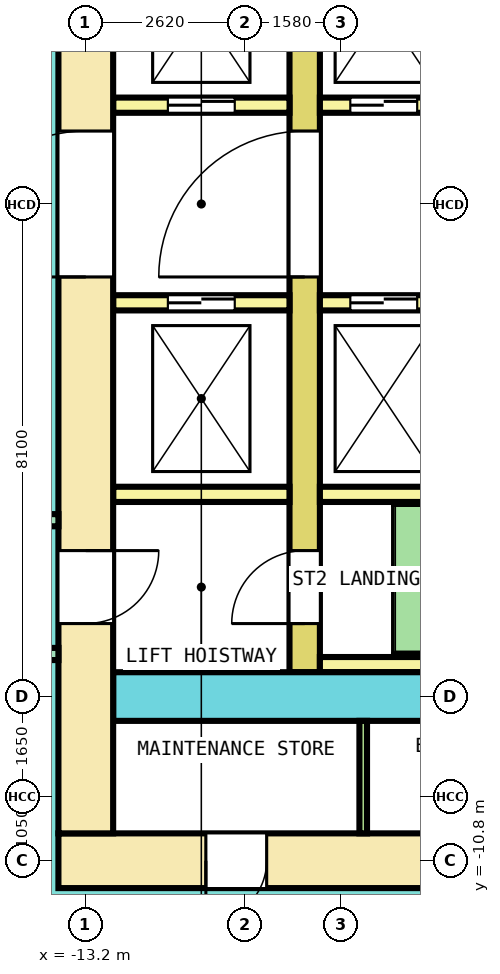
"""IFC4 building model, lengths in metres.
Left out: names, types, materials, properties, quantities, classifications, styles, units other than length and angle.
Written with IfcOpenShell. Run it as: python <this file> out.ifc"""

import sys

from ifc_helpers import new_model, si_unit, direction, frame, frame_2d, origin, place, context, subcontext, project, spatial, rectangle, extrude, element, fill, save


model = new_model("IFC4")
c1 = context("Model", 3, precision=1e-05, world=origin(), true_north=direction((0.0, 1.0)))
c2 = subcontext(c1, "Body", "Model", "MODEL_VIEW")
j1 = project(units=[si_unit("LENGTHUNIT", "METRE"), si_unit("PLANEANGLEUNIT", "RADIAN")], contexts=[c1])
p1 = place(None, origin())
s1 = spatial("IfcSite", under=j1, at=p1, CompositionType="ELEMENT")
p2 = place(p1, origin())
s2 = spatial("IfcBuilding", under=s1, at=p2, CompositionType="ELEMENT")
p3 = place(p2, origin())
s3 = spatial("IfcBuildingStorey", under=s2, at=p3, CompositionType="ELEMENT", Elevation=0.0)
p4 = place(p3, frame((-13.65, -10.8, 0.0), z_axis=(0.0, 0.0, 1.0), x_axis=(1.0, 0.0, 0.0)))
e1 = element("IfcWall", 1, at=p4, inside=s3, PredefinedType="SHEAR", context=c2, shape_type="SweptSolid", body=[
    extrude(rectangle(XDim=27.3, YDim=0.9, at=frame_2d((13.65, 0.0))), origin(), (0.0, 0.0, 1.0), 5.3),
])
p5 = place(p4, frame((2.425, 0.0, 0.0)))
e2 = element("IfcOpeningElement", 2, at=p5, cuts=e1, PredefinedType="OPENING", context=c2, shape_type="SweptSolid", body=[
    extrude(rectangle(XDim=1.0, YDim=2.1, at=frame_2d((0.5, 1.05))), frame((0.0, 0.46, 0.0), z_axis=(0.0, -1.0, 0.0), x_axis=(1.0, 0.0, 0.0)), (0.0, 0.0, 1.0), 0.92),
])
p6 = place(p4, frame((6.569, 0.0, 0.0)))
e3 = element("IfcOpeningElement", 3, at=p6, cuts=e1, PredefinedType="OPENING", context=c2, shape_type="SweptSolid", body=[
    extrude(rectangle(XDim=1.0, YDim=2.1, at=frame_2d((0.5, 1.05))), frame((0.0, 0.46, 0.0), z_axis=(0.0, -1.0, 0.0), x_axis=(1.0, 0.0, 0.0)), (0.0, 0.0, 1.0), 0.92),
])
p7 = place(p4, frame((10.681, 0.0, 0.0)))
e4 = element("IfcOpeningElement", 4, at=p7, cuts=e1, PredefinedType="OPENING", context=c2, shape_type="SweptSolid", body=[
    extrude(rectangle(XDim=1.0, YDim=2.1, at=frame_2d((0.5, 1.05))), frame((0.0, 0.46, 0.0), z_axis=(0.0, -1.0, 0.0), x_axis=(1.0, 0.0, 0.0)), (0.0, 0.0, 1.0), 0.92),
])
p8 = place(p4, frame((19.202, 0.0, 0.0)))
e5 = element("IfcOpeningElement", 5, at=p8, cuts=e1, PredefinedType="OPENING", context=c2, shape_type="SweptSolid", body=[
    extrude(rectangle(XDim=1.0, YDim=2.1, at=frame_2d((0.5, 1.05))), frame((0.0, 0.46, 0.0), z_axis=(0.0, -1.0, 0.0), x_axis=(1.0, 0.0, 0.0)), (0.0, 0.0, 1.0), 0.92),
])
p9 = place(p4, frame((21.881, 0.0, 0.0)))
e6 = element("IfcOpeningElement", 6, at=p9, cuts=e1, PredefinedType="OPENING", context=c2, shape_type="SweptSolid", body=[
    extrude(rectangle(XDim=1.0, YDim=2.1, at=frame_2d((0.5, 1.05))), frame((0.0, 0.46, 0.0), z_axis=(0.0, -1.0, 0.0), x_axis=(1.0, 0.0, 0.0)), (0.0, 0.0, 1.0), 0.92),
])
p10 = place(p4, frame((24.592, 0.0, 0.0)))
e7 = element("IfcOpeningElement", 7, at=p10, cuts=e1, PredefinedType="OPENING", context=c2, shape_type="SweptSolid", body=[
    extrude(rectangle(XDim=1.0, YDim=2.1, at=frame_2d((0.5, 1.05))), frame((0.0, 0.46, 0.0), z_axis=(0.0, -1.0, 0.0), x_axis=(1.0, 0.0, 0.0)), (0.0, 0.0, 1.0), 0.92),
])
p11 = place(p4, frame((15.2, 0.0, 0.0)))
e8 = element("IfcOpeningElement", 8, at=p11, cuts=e1, PredefinedType="OPENING", context=c2, shape_type="SweptSolid", body=[
    extrude(rectangle(XDim=1.2, YDim=2.1, at=frame_2d((0.6, 1.05))), frame((0.0, 0.46, 0.0), z_axis=(0.0, -1.0, 0.0), x_axis=(1.0, 0.0, 0.0)), (0.0, 0.0, 1.0), 0.92),
])
p12 = place(p3, frame((-13.2, -10.35, 0.0), z_axis=(0.0, 0.0, 1.0), x_axis=(0.0, 1.0, 0.0)))
e9 = element("IfcWall", 9, at=p12, inside=s3, PredefinedType="SHEAR", context=c2, shape_type="SweptSolid", body=[
    extrude(rectangle(XDim=20.7, YDim=0.9, at=frame_2d((10.35, 0.0))), origin(), (0.0, 0.0, 1.0), 5.3),
])
p13 = place(p12, frame((9.15, 0.0, 0.0)))
e10 = element("IfcOpeningElement", 10, at=p13, cuts=e9, PredefinedType="OPENING", context=c2, shape_type="SweptSolid", body=[
    extrude(rectangle(XDim=2.4, YDim=2.1, at=frame_2d((1.2, 1.05))), frame((0.0, 0.46, 0.0), z_axis=(0.0, -1.0, 0.0), x_axis=(1.0, 0.0, 0.0)), (0.0, 0.0, 1.0), 0.92),
])
p14 = place(p12, frame((16.05, 0.0, 0.0)))
e11 = element("IfcOpeningElement", 11, at=p14, cuts=e9, PredefinedType="OPENING", context=c2, shape_type="SweptSolid", body=[
    extrude(rectangle(XDim=1.2, YDim=2.1, at=frame_2d((0.6, 1.05))), frame((0.0, 0.46, 0.0), z_axis=(0.0, -1.0, 0.0), x_axis=(1.0, 0.0, 0.0)), (0.0, 0.0, 1.0), 0.92),
])
p15 = place(p12, frame((3.45, 0.0, 0.0)))
e12 = element("IfcOpeningElement", 12, at=p15, cuts=e9, PredefinedType="OPENING", context=c2, shape_type="SweptSolid", body=[
    extrude(rectangle(XDim=1.2, YDim=2.1, at=frame_2d((0.6, 1.05))), frame((0.0, 0.46, 0.0), z_axis=(0.0, -1.0, 0.0), x_axis=(1.0, 0.0, 0.0)), (0.0, 0.0, 1.0), 0.92),
])
p16 = place(p3, frame((-12.75, -8.1, 0.0), z_axis=(0.0, 0.0, 1.0), x_axis=(1.0, 0.0, 0.0)))
e13 = element("IfcWall", 13, at=p16, inside=s3, PredefinedType="SHEAR", context=c2, shape_type="SweptSolid", body=[
    extrude(rectangle(XDim=25.5, YDim=0.8, at=frame_2d((12.75, 0.0))), origin(), (0.0, 0.0, 1.0), 5.3),
])
p17 = place(p16, frame((14.3, 0.0, 0.0)))
e14 = element("IfcOpeningElement", 14, at=p17, cuts=e13, PredefinedType="OPENING", context=c2, shape_type="SweptSolid", body=[
    extrude(rectangle(XDim=1.2, YDim=2.1, at=frame_2d((0.6, 1.05))), frame((0.0, 0.41, 0.0), z_axis=(0.0, -1.0, 0.0), x_axis=(1.0, 0.0, 0.0)), (0.0, 0.0, 1.0), 0.82),
])
p18 = place(p3, frame((-9.6, -7.7, 0.0), z_axis=(0.0, 0.0, 1.0), x_axis=(0.0, 1.0, 0.0)))
e15 = element("IfcWall", 15, at=p18, inside=s3, PredefinedType="SHEAR", context=c2, shape_type="SweptSolid", body=[
    extrude(rectangle(XDim=15.4, YDim=0.5, at=frame_2d((7.7, 0.0))), origin(), (0.0, 0.0, 1.0), 5.3),
])
p19 = place(p18, frame((6.5, 0.0, 0.0)))
e16 = element("IfcOpeningElement", 16, at=p19, cuts=e15, PredefinedType="OPENING", context=c2, shape_type="SweptSolid", body=[
    extrude(rectangle(XDim=2.4, YDim=2.1, at=frame_2d((1.2, 1.05))), frame((0.0, 0.26, 0.0), z_axis=(0.0, -1.0, 0.0), x_axis=(1.0, 0.0, 0.0)), (0.0, 0.0, 1.0), 0.52),
])
p20 = place(p18, frame((13.4, 0.0, 0.0)))
e17 = element("IfcOpeningElement", 17, at=p20, cuts=e15, PredefinedType="OPENING", context=c2, shape_type="SweptSolid", body=[
    extrude(rectangle(XDim=1.2, YDim=2.1, at=frame_2d((0.6, 1.05))), frame((0.0, 0.26, 0.0), z_axis=(0.0, -1.0, 0.0), x_axis=(1.0, 0.0, 0.0)), (0.0, 0.0, 1.0), 0.52),
])
p21 = place(p18, frame((0.8, 0.0, 0.0)))
e18 = element("IfcOpeningElement", 18, at=p21, cuts=e15, PredefinedType="OPENING", context=c2, shape_type="SweptSolid", body=[
    extrude(rectangle(XDim=1.2, YDim=2.1, at=frame_2d((0.6, 1.05))), frame((0.0, 0.26, 0.0), z_axis=(0.0, -1.0, 0.0), x_axis=(1.0, 0.0, 0.0)), (0.0, 0.0, 1.0), 0.52),
])
p22 = place(p3, frame((-12.75, 1.625, 0.0), z_axis=(0.0, 0.0, 1.0), x_axis=(1.0, 0.0, 0.0)))
e19 = element("IfcWall", 19, at=p22, inside=s3, PredefinedType="SOLIDWALL", context=c2, shape_type="SweptSolid", body=[
    extrude(rectangle(XDim=2.9, YDim=0.25, at=frame_2d((1.45, 0.0))), origin(), (0.0, 0.0, 1.0), 5.3),
])
p23 = place(p22, frame((0.9, 0.0, 0.0)))
e20 = element("IfcOpeningElement", 20, at=p23, cuts=e19, PredefinedType="OPENING", context=c2, shape_type="SweptSolid", body=[
    extrude(rectangle(XDim=1.1, YDim=2.1, at=frame_2d((0.55, 1.05))), frame((0.0, 0.135, 0.0), z_axis=(0.0, -1.0, 0.0), x_axis=(1.0, 0.0, 0.0)), (0.0, 0.0, 1.0), 0.27),
])
p24 = place(p3, frame((-9.35, 1.625, 0.0), z_axis=(0.0, 0.0, 1.0), x_axis=(1.0, 0.0, 0.0)))
e21 = element("IfcWall", 21, at=p24, inside=s3, PredefinedType="SOLIDWALL", context=c2, shape_type="SweptSolid", body=[
    extrude(rectangle(XDim=18.7, YDim=0.25, at=frame_2d((9.35, 0.0))), origin(), (0.0, 0.0, 1.0), 5.3),
])
p25 = place(p24, frame((0.5, 0.0, 0.0)))
e22 = element("IfcOpeningElement", 22, at=p25, cuts=e21, PredefinedType="OPENING", context=c2, shape_type="SweptSolid", body=[
    extrude(rectangle(XDim=1.1, YDim=2.1, at=frame_2d((0.55, 1.05))), frame((0.0, 0.135, 0.0), z_axis=(0.0, -1.0, 0.0), x_axis=(1.0, 0.0, 0.0)), (0.0, 0.0, 1.0), 0.27),
])
p26 = place(p24, frame((2.85, 0.0, 0.0)))
e23 = element("IfcOpeningElement", 23, at=p26, cuts=e21, PredefinedType="OPENING", context=c2, shape_type="SweptSolid", body=[
    extrude(rectangle(XDim=1.1, YDim=2.1, at=frame_2d((0.55, 1.05))), frame((0.0, 0.135, 0.0), z_axis=(0.0, -1.0, 0.0), x_axis=(1.0, 0.0, 0.0)), (0.0, 0.0, 1.0), 0.27),
])
p27 = place(p24, frame((5.15, 0.0, 0.0)))
e24 = element("IfcOpeningElement", 24, at=p27, cuts=e21, PredefinedType="OPENING", context=c2, shape_type="SweptSolid", body=[
    extrude(rectangle(XDim=1.1, YDim=2.1, at=frame_2d((0.55, 1.05))), frame((0.0, 0.135, 0.0), z_axis=(0.0, -1.0, 0.0), x_axis=(1.0, 0.0, 0.0)), (0.0, 0.0, 1.0), 0.27),
])
p28 = place(p24, frame((7.65, 0.0, 0.0)))
e25 = element("IfcOpeningElement", 25, at=p28, cuts=e21, PredefinedType="OPENING", context=c2, shape_type="SweptSolid", body=[
    extrude(rectangle(XDim=1.1, YDim=2.1, at=frame_2d((0.55, 1.05))), frame((0.0, 0.135, 0.0), z_axis=(0.0, -1.0, 0.0), x_axis=(1.0, 0.0, 0.0)), (0.0, 0.0, 1.0), 0.27),
])
p29 = place(p24, frame((9.95, 0.0, 0.0)))
e26 = element("IfcOpeningElement", 26, at=p29, cuts=e21, PredefinedType="OPENING", context=c2, shape_type="SweptSolid", body=[
    extrude(rectangle(XDim=1.1, YDim=2.1, at=frame_2d((0.55, 1.05))), frame((0.0, 0.135, 0.0), z_axis=(0.0, -1.0, 0.0), x_axis=(1.0, 0.0, 0.0)), (0.0, 0.0, 1.0), 0.27),
])
p30 = place(p24, frame((12.4, 0.0, 0.0)))
e27 = element("IfcOpeningElement", 27, at=p30, cuts=e21, PredefinedType="OPENING", context=c2, shape_type="SweptSolid", body=[
    extrude(rectangle(XDim=1.1, YDim=2.1, at=frame_2d((0.55, 1.05))), frame((0.0, 0.135, 0.0), z_axis=(0.0, -1.0, 0.0), x_axis=(1.0, 0.0, 0.0)), (0.0, 0.0, 1.0), 0.27),
])
p31 = place(p24, frame((14.8, 0.0, 0.0)))
e28 = element("IfcOpeningElement", 28, at=p31, cuts=e21, PredefinedType="OPENING", context=c2, shape_type="SweptSolid", body=[
    extrude(rectangle(XDim=1.1, YDim=2.1, at=frame_2d((0.55, 1.05))), frame((0.0, 0.135, 0.0), z_axis=(0.0, -1.0, 0.0), x_axis=(1.0, 0.0, 0.0)), (0.0, 0.0, 1.0), 0.27),
])
p32 = place(p24, frame((17.1, 0.0, 0.0)))
e29 = element("IfcOpeningElement", 29, at=p32, cuts=e21, PredefinedType="OPENING", context=c2, shape_type="SweptSolid", body=[
    extrude(rectangle(XDim=1.1, YDim=2.1, at=frame_2d((0.55, 1.05))), frame((0.0, 0.135, 0.0), z_axis=(0.0, -1.0, 0.0), x_axis=(1.0, 0.0, 0.0)), (0.0, 0.0, 1.0), 0.27),
])
p33 = place(p3, frame((-12.75, -1.625, 0.0), z_axis=(0.0, 0.0, 1.0), x_axis=(1.0, 0.0, 0.0)))
e30 = element("IfcWall", 30, at=p33, inside=s3, PredefinedType="SOLIDWALL", context=c2, shape_type="SweptSolid", body=[
    extrude(rectangle(XDim=2.9, YDim=0.25, at=frame_2d((1.45, 0.0))), origin(), (0.0, 0.0, 1.0), 5.3),
])
p34 = place(p33, frame((0.9, 0.0, 0.0)))
e31 = element("IfcOpeningElement", 31, at=p34, cuts=e30, PredefinedType="OPENING", context=c2, shape_type="SweptSolid", body=[
    extrude(rectangle(XDim=1.1, YDim=2.1, at=frame_2d((0.55, 1.05))), frame((0.0, 0.135, 0.0), z_axis=(0.0, -1.0, 0.0), x_axis=(1.0, 0.0, 0.0)), (0.0, 0.0, 1.0), 0.27),
])
p35 = place(p3, frame((-9.35, -1.625, 0.0), z_axis=(0.0, 0.0, 1.0), x_axis=(1.0, 0.0, 0.0)))
e32 = element("IfcWall", 32, at=p35, inside=s3, PredefinedType="SOLIDWALL", context=c2, shape_type="SweptSolid", body=[
    extrude(rectangle(XDim=18.7, YDim=0.25, at=frame_2d((9.35, 0.0))), origin(), (0.0, 0.0, 1.0), 5.3),
])
p36 = place(p35, frame((0.5, 0.0, 0.0)))
e33 = element("IfcOpeningElement", 33, at=p36, cuts=e32, PredefinedType="OPENING", context=c2, shape_type="SweptSolid", body=[
    extrude(rectangle(XDim=1.1, YDim=2.1, at=frame_2d((0.55, 1.05))), frame((0.0, 0.135, 0.0), z_axis=(0.0, -1.0, 0.0), x_axis=(1.0, 0.0, 0.0)), (0.0, 0.0, 1.0), 0.27),
])
p37 = place(p35, frame((2.85, 0.0, 0.0)))
e34 = element("IfcOpeningElement", 34, at=p37, cuts=e32, PredefinedType="OPENING", context=c2, shape_type="SweptSolid", body=[
    extrude(rectangle(XDim=1.1, YDim=2.1, at=frame_2d((0.55, 1.05))), frame((0.0, 0.135, 0.0), z_axis=(0.0, -1.0, 0.0), x_axis=(1.0, 0.0, 0.0)), (0.0, 0.0, 1.0), 0.27),
])
p38 = place(p35, frame((5.15, 0.0, 0.0)))
e35 = element("IfcOpeningElement", 35, at=p38, cuts=e32, PredefinedType="OPENING", context=c2, shape_type="SweptSolid", body=[
    extrude(rectangle(XDim=1.1, YDim=2.1, at=frame_2d((0.55, 1.05))), frame((0.0, 0.135, 0.0), z_axis=(0.0, -1.0, 0.0), x_axis=(1.0, 0.0, 0.0)), (0.0, 0.0, 1.0), 0.27),
])
p39 = place(p35, frame((7.65, 0.0, 0.0)))
e36 = element("IfcOpeningElement", 36, at=p39, cuts=e32, PredefinedType="OPENING", context=c2, shape_type="SweptSolid", body=[
    extrude(rectangle(XDim=1.1, YDim=2.1, at=frame_2d((0.55, 1.05))), frame((0.0, 0.135, 0.0), z_axis=(0.0, -1.0, 0.0), x_axis=(1.0, 0.0, 0.0)), (0.0, 0.0, 1.0), 0.27),
])
p40 = place(p35, frame((9.95, 0.0, 0.0)))
e37 = element("IfcOpeningElement", 37, at=p40, cuts=e32, PredefinedType="OPENING", context=c2, shape_type="SweptSolid", body=[
    extrude(rectangle(XDim=1.1, YDim=2.1, at=frame_2d((0.55, 1.05))), frame((0.0, 0.135, 0.0), z_axis=(0.0, -1.0, 0.0), x_axis=(1.0, 0.0, 0.0)), (0.0, 0.0, 1.0), 0.27),
])
p41 = place(p35, frame((12.4, 0.0, 0.0)))
e38 = element("IfcOpeningElement", 38, at=p41, cuts=e32, PredefinedType="OPENING", context=c2, shape_type="SweptSolid", body=[
    extrude(rectangle(XDim=1.1, YDim=2.1, at=frame_2d((0.55, 1.05))), frame((0.0, 0.135, 0.0), z_axis=(0.0, -1.0, 0.0), x_axis=(1.0, 0.0, 0.0)), (0.0, 0.0, 1.0), 0.27),
])
p42 = place(p35, frame((14.8, 0.0, 0.0)))
e39 = element("IfcOpeningElement", 39, at=p42, cuts=e32, PredefinedType="OPENING", context=c2, shape_type="SweptSolid", body=[
    extrude(rectangle(XDim=1.1, YDim=2.1, at=frame_2d((0.55, 1.05))), frame((0.0, 0.135, 0.0), z_axis=(0.0, -1.0, 0.0), x_axis=(1.0, 0.0, 0.0)), (0.0, 0.0, 1.0), 0.27),
])
p43 = place(p35, frame((17.1, 0.0, 0.0)))
e40 = element("IfcOpeningElement", 40, at=p43, cuts=e32, PredefinedType="OPENING", context=c2, shape_type="SweptSolid", body=[
    extrude(rectangle(XDim=1.1, YDim=2.1, at=frame_2d((0.55, 1.05))), frame((0.0, 0.135, 0.0), z_axis=(0.0, -1.0, 0.0), x_axis=(1.0, 0.0, 0.0)), (0.0, 0.0, 1.0), 0.27),
])
p44 = place(p3, frame((-12.75, -4.775, 0.0), z_axis=(0.0, 0.0, 1.0), x_axis=(1.0, 0.0, 0.0)))
e41 = element("IfcWall", 41, at=p44, inside=s3, PredefinedType="SOLIDWALL", context=c2, shape_type="SweptSolid", body=[
    extrude(rectangle(XDim=2.9, YDim=0.25, at=frame_2d((1.45, 0.0))), origin(), (0.0, 0.0, 1.0), 5.3),
])
p45 = place(p3, frame((-9.35, -4.775, 0.0), z_axis=(0.0, 0.0, 1.0), x_axis=(1.0, 0.0, 0.0)))
e42 = element("IfcWall", 42, at=p45, inside=s3, PredefinedType="SOLIDWALL", context=c2, shape_type="SweptSolid", body=[
    extrude(rectangle(XDim=18.7, YDim=0.25, at=frame_2d((9.35, 0.0))), origin(), (0.0, 0.0, 1.0), 5.3),
])
p46 = place(p3, frame((-9.35, -7.575, 0.0), z_axis=(0.0, 0.0, 1.0), x_axis=(1.0, 0.0, 0.0)))
e43 = element("IfcWall", 43, at=p46, inside=s3, PredefinedType="SOLIDWALL", context=c2, shape_type="SweptSolid", body=[
    extrude(rectangle(XDim=5.8, YDim=0.25, at=frame_2d((2.9, 0.0))), origin(), (0.0, 0.0, 1.0), 5.3),
])
p47 = place(p3, frame((-8.637, -10.35, 0.0), z_axis=(0.0, 0.0, 1.0), x_axis=(0.0, 1.0, 0.0)))
e44 = element("IfcWall", 44, at=p47, inside=s3, PredefinedType="PARTITIONING", context=c2, shape_type="SweptSolid", body=[
    extrude(rectangle(XDim=1.85, YDim=0.125, at=frame_2d((0.925, 0.0))), origin(), (0.0, 0.0, 1.0), 5.3),
])
p48 = place(p3, frame((-16.873, -5.2, 0.0), z_axis=(0.0, 0.0, 1.0), x_axis=(1.0, 0.0, 0.0)))
e45 = element("IfcWall", 45, at=p48, inside=s3, PredefinedType="PARTITIONING", context=c2, shape_type="SweptSolid", body=[
    extrude(rectangle(XDim=3.223, YDim=0.2, at=frame_2d((1.612, 0.0))), origin(), (0.0, 0.0, 1.0), 4.2),
])
p49 = place(p48, frame((1.123, 0.0, 0.0)))
e46 = element("IfcOpeningElement", 46, at=p49, cuts=e45, PredefinedType="OPENING", context=c2, shape_type="SweptSolid", body=[
    extrude(rectangle(XDim=1.2, YDim=2.1, at=frame_2d((0.6, 1.05))), frame((0.0, 0.11, 0.0), z_axis=(0.0, -1.0, 0.0), x_axis=(1.0, 0.0, 0.0)), (0.0, 0.0, 1.0), 0.22),
])
p50 = place(p3, frame((-17.727, -7.4, 0.0), z_axis=(0.0, 0.0, 1.0), x_axis=(1.0, 0.0, 0.0)))
e47 = element("IfcWall", 47, at=p50, inside=s3, PredefinedType="PARTITIONING", context=c2, shape_type="SweptSolid", body=[
    extrude(rectangle(XDim=4.077, YDim=0.2, at=frame_2d((2.038, 0.0))), origin(), (0.0, 0.0, 1.0), 4.2),
])
p51 = place(p50, frame((1.977, 0.0, 0.0)))
e48 = element("IfcOpeningElement", 48, at=p51, cuts=e47, PredefinedType="OPENING", context=c2, shape_type="SweptSolid", body=[
    extrude(rectangle(XDim=1.2, YDim=2.1, at=frame_2d((0.6, 1.05))), frame((0.0, 0.11, 0.0), z_axis=(0.0, -1.0, 0.0), x_axis=(1.0, 0.0, 0.0)), (0.0, 0.0, 1.0), 0.22),
])
p52 = place(p23, origin())
e49 = element("IfcDoor", 49, at=p52, inside=s3, OperationType="DOUBLE_DOOR_SLIDING", PredefinedType="DOOR", context=c2, shape_type="SweptSolid", body=[
    extrude(rectangle(XDim=1.1, YDim=2.1, at=frame_2d((0.55, 1.05))), frame((0.0, 0.075, 0.0), z_axis=(0.0, -1.0, 0.0), x_axis=(1.0, 0.0, 0.0)), (0.0, 0.0, 1.0), 0.15),
])
fill(e20, e49)
p53 = place(p25, origin())
e50 = element("IfcDoor", 50, at=p53, inside=s3, OperationType="DOUBLE_DOOR_SLIDING", PredefinedType="DOOR", context=c2, shape_type="SweptSolid", body=[
    extrude(rectangle(XDim=1.1, YDim=2.1, at=frame_2d((0.55, 1.05))), frame((0.0, 0.075, 0.0), z_axis=(0.0, -1.0, 0.0), x_axis=(1.0, 0.0, 0.0)), (0.0, 0.0, 1.0), 0.15),
])
fill(e22, e50)
p54 = place(p34, origin())
e51 = element("IfcDoor", 51, at=p54, inside=s3, OperationType="DOUBLE_DOOR_SLIDING", PredefinedType="DOOR", context=c2, shape_type="SweptSolid", body=[
    extrude(rectangle(XDim=1.1, YDim=2.1, at=frame_2d((0.55, 1.05))), frame((0.0, 0.075, 0.0), z_axis=(0.0, -1.0, 0.0), x_axis=(1.0, 0.0, 0.0)), (0.0, 0.0, 1.0), 0.15),
])
fill(e31, e51)
p55 = place(p36, origin())
e52 = element("IfcDoor", 52, at=p55, inside=s3, OperationType="DOUBLE_DOOR_SLIDING", PredefinedType="DOOR", context=c2, shape_type="SweptSolid", body=[
    extrude(rectangle(XDim=1.1, YDim=2.1, at=frame_2d((0.55, 1.05))), frame((0.0, 0.075, 0.0), z_axis=(0.0, -1.0, 0.0), x_axis=(1.0, 0.0, 0.0)), (0.0, 0.0, 1.0), 0.15),
])
fill(e33, e52)
p56 = place(p19, origin())
e53 = element("IfcDoor", 53, at=p56, inside=s3, OperationType="DOUBLE_DOOR_SINGLE_SWING", PredefinedType="DOOR", context=c2, shape_type="SweptSolid", body=[
    extrude(rectangle(XDim=2.4, YDim=2.1, at=frame_2d((1.2, 1.05))), frame((0.0, 0.2, 0.0), z_axis=(0.0, -1.0, 0.0), x_axis=(1.0, 0.0, 0.0)), (0.0, 0.0, 1.0), 0.4),
])
fill(e16, e53)
p57 = place(p13, origin())
e54 = element("IfcDoor", 54, at=p57, inside=s3, OperationType="DOUBLE_DOOR_SINGLE_SWING", PredefinedType="DOOR", context=c2, shape_type="SweptSolid", body=[
    extrude(rectangle(XDim=2.4, YDim=2.1, at=frame_2d((1.2, 1.05))), frame((0.0, 0.3, 0.0), z_axis=(0.0, -1.0, 0.0), x_axis=(1.0, 0.0, 0.0)), (0.0, 0.0, 1.0), 0.6),
])
fill(e10, e54)
p58 = place(p21, origin())
e55 = element("IfcDoor", 55, at=p58, inside=s3, OperationType="SINGLE_SWING_LEFT", PredefinedType="DOOR", context=c2, shape_type="SweptSolid", body=[
    extrude(rectangle(XDim=1.2, YDim=2.1, at=frame_2d((0.6, 1.05))), frame((0.0, 0.2, 0.0), z_axis=(0.0, -1.0, 0.0), x_axis=(1.0, 0.0, 0.0)), (0.0, 0.0, 1.0), 0.4),
])
fill(e18, e55)
p59 = place(p15, origin())
e56 = element("IfcDoor", 56, at=p59, inside=s3, OperationType="SINGLE_SWING_RIGHT", PredefinedType="DOOR", context=c2, shape_type="SweptSolid", body=[
    extrude(rectangle(XDim=1.2, YDim=2.1, at=frame_2d((0.6, 1.05))), frame((0.0, 0.3, 0.0), z_axis=(0.0, -1.0, 0.0), x_axis=(1.0, 0.0, 0.0)), (0.0, 0.0, 1.0), 0.6),
])
fill(e12, e56)
p60 = place(p5, origin())
e57 = element("IfcDoor", 57, at=p60, inside=s3, OperationType="SINGLE_SWING_RIGHT", PredefinedType="DOOR", context=c2, shape_type="SweptSolid", body=[
    extrude(rectangle(XDim=1.0, YDim=2.1, at=frame_2d((0.5, 1.05))), frame((0.0, 0.3, 0.0), z_axis=(0.0, -1.0, 0.0), x_axis=(1.0, 0.0, 0.0)), (0.0, 0.0, 1.0), 0.6),
])
fill(e2, e57)
save(model, sys.argv[1])
